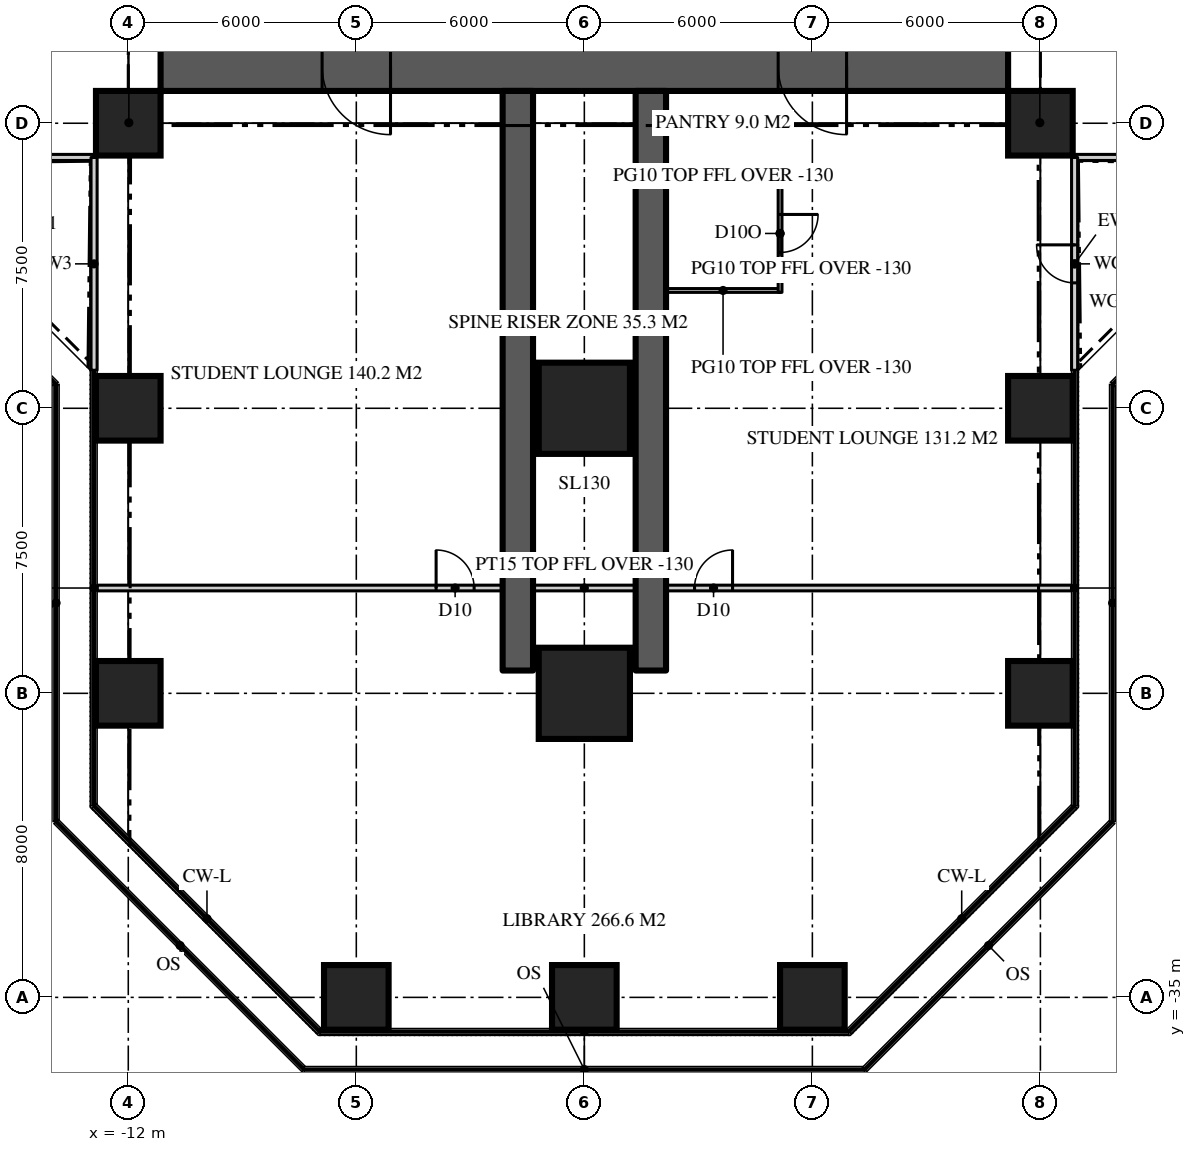
"""IFC4 building model, lengths in metres.
Left out: names, types, materials, properties, quantities, classifications, styles, units other than length and angle.
Written with IfcOpenShell. Run it as: python <this file> out.ifc"""

import sys

from ifc_helpers import new_model, si_unit, direction, frame, frame_2d, origin, origin_2d, place, context, subcontext, project, spatial, rectangle, extrude, element, fill, save


model = new_model("IFC4")
c1 = context("Model", 3, precision=1e-05, world=origin(), true_north=direction((0.0, 1.0)))
c2 = subcontext(c1, "Body", "Model", "MODEL_VIEW")
j1 = project(units=[si_unit("LENGTHUNIT", "METRE"), si_unit("PLANEANGLEUNIT", "RADIAN")], contexts=[c1])
p1 = place(None, origin())
s1 = spatial("IfcSite", under=j1, at=p1, CompositionType="ELEMENT")
p2 = place(p1, origin())
s2 = spatial("IfcBuilding", under=s1, at=p2, CompositionType="ELEMENT")
p3 = place(p2, frame((0.0, 0.0, 105.9)))
s3 = spatial("IfcBuildingStorey", under=s2, at=p3, CompositionType="ELEMENT", Elevation=105.9)
p4 = place(p3, frame((11.15, -10.5, 0.0), z_axis=(0.0, 0.0, 1.0), x_axis=(-1.0, 0.0, 0.0)))
e1 = element("IfcWall", 1, at=p4, inside=s3, PredefinedType="SHEAR", context=c2, shape_type="SweptSolid", body=[
    extrude(rectangle(XDim=22.3, YDim=1.3, at=frame_2d((11.15, 0.0))), origin(), (0.0, 0.0, 1.0), 3.9),
])
p5 = place(p4, frame((16.25, 0.0, 0.0)))
e2 = element("IfcOpeningElement", 2, at=p5, cuts=e1, PredefinedType="OPENING", context=c2, shape_type="SweptSolid", body=[
    extrude(rectangle(XDim=1.8, YDim=2.2, at=frame_2d((0.9, 1.1))), frame((0.0, 0.66, 0.0), z_axis=(0.0, -1.0, 0.0), x_axis=(1.0, 0.0, 0.0)), (0.0, 0.0, 1.0), 1.32),
])
p6 = place(p4, frame((4.25, 0.0, 0.0)))
e3 = element("IfcOpeningElement", 3, at=p6, cuts=e1, PredefinedType="OPENING", context=c2, shape_type="SweptSolid", body=[
    extrude(rectangle(XDim=1.8, YDim=2.2, at=frame_2d((0.9, 1.1))), frame((0.0, 0.66, 0.0), z_axis=(0.0, -1.0, 0.0), x_axis=(1.0, 0.0, 0.0)), (0.0, 0.0, 1.0), 1.32),
])
for number, where, z_axis, x_axis in (
    (4, (-1.75, -11.15, 0.0), (0.0, 0.0, 1.0), (0.0, -1.0, 0.0)),
    (5, (1.75, -11.15, 0.0), (0.0, 0.0, 1.0), (0.0, -1.0, 0.0)),
):
    element("IfcWall", number, at=place(p3, frame(where, z_axis=z_axis, x_axis=x_axis)), inside=s3, PredefinedType="SHEAR", context=c2, shape_type="SweptSolid", body=[
        extrude(rectangle(XDim=15.25, YDim=0.8, at=frame_2d((7.625, 0.0))), origin(), (0.0, 0.0, 1.0), 3.9),
    ])
for number, where, z_axis, x_axis in (
    (6, (-6.0, -35.0, 0.0), (0.0, 0.0, 1.0), (1.0, 0.0, 0.0)),
    (7, (0.0, -35.0, 0.0), (0.0, 0.0, 1.0), (1.0, 0.0, 0.0)),
    (8, (6.0, -35.0, 0.0), (0.0, 0.0, 1.0), (1.0, 0.0, 0.0)),
    (9, (-12.0, -27.0, 0.0), (0.0, 0.0, 1.0), (1.0, 0.0, 0.0)),
):
    element("IfcColumn", number, at=place(p3, frame(where, z_axis=z_axis, x_axis=x_axis)), inside=s3, PredefinedType="COLUMN", context=c2, shape_type="SweptSolid", body=[
        extrude(rectangle(XDim=1.7, YDim=1.7, at=origin_2d()), origin(), (0.0, 0.0, 1.0), 3.9),
    ])
p7 = place(p3, frame((0.0, -27.0, 0.0), z_axis=(0.0, 0.0, 1.0), x_axis=(1.0, 0.0, 0.0)))
e10 = element("IfcColumn", 10, at=p7, inside=s3, PredefinedType="COLUMN", context=c2, shape_type="SweptSolid", body=[
    extrude(rectangle(XDim=2.4, YDim=2.4, at=origin_2d()), origin(), (0.0, 0.0, 1.0), 3.9),
])
for number, where, z_axis, x_axis in (
    (11, (12.0, -27.0, 0.0), (0.0, 0.0, 1.0), (1.0, 0.0, 0.0)),
    (12, (-12.0, -19.5, 0.0), (0.0, 0.0, 1.0), (1.0, 0.0, 0.0)),
):
    element("IfcColumn", number, at=place(p3, frame(where, z_axis=z_axis, x_axis=x_axis)), inside=s3, PredefinedType="COLUMN", context=c2, shape_type="SweptSolid", body=[
        extrude(rectangle(XDim=1.7, YDim=1.7, at=origin_2d()), origin(), (0.0, 0.0, 1.0), 3.9),
    ])
p8 = place(p3, frame((0.0, -19.5, 0.0), z_axis=(0.0, 0.0, 1.0), x_axis=(1.0, 0.0, 0.0)))
e13 = element("IfcColumn", 13, at=p8, inside=s3, PredefinedType="COLUMN", context=c2, shape_type="SweptSolid", body=[
    extrude(rectangle(XDim=2.4, YDim=2.4, at=origin_2d()), origin(), (0.0, 0.0, 1.0), 3.9),
])
for number, where, z_axis, x_axis in (
    (14, (12.0, -19.5, 0.0), (0.0, 0.0, 1.0), (1.0, 0.0, 0.0)),
    (15, (-12.0, -12.0, 0.0), (0.0, 0.0, 1.0), (1.0, 0.0, 0.0)),
    (16, (12.0, -12.0, 0.0), (0.0, 0.0, 1.0), (1.0, 0.0, 0.0)),
):
    element("IfcColumn", number, at=place(p3, frame(where, z_axis=z_axis, x_axis=x_axis)), inside=s3, PredefinedType="COLUMN", context=c2, shape_type="SweptSolid", body=[
        extrude(rectangle(XDim=1.7, YDim=1.7, at=origin_2d()), origin(), (0.0, 0.0, 1.0), 3.9),
    ])
p9 = place(p3, frame((12.9, -12.9, 0.0), z_axis=(0.0, 0.0, 1.0), x_axis=(1.0, 0.0, 0.0)))
e17 = element("IfcWall", 17, at=p9, inside=s3, PredefinedType="SOLIDWALL", context=c2, shape_type="SweptSolid", body=[
    extrude(rectangle(XDim=5.6, YDim=0.16, at=frame_2d((2.8, 0.0))), origin(), (0.0, 0.0, 1.0), 3.77),
])
p10 = place(p3, frame((-18.5, -12.9, 0.0), z_axis=(0.0, 0.0, 1.0), x_axis=(1.0, 0.0, 0.0)))
e18 = element("IfcWall", 18, at=p10, inside=s3, PredefinedType="SOLIDWALL", context=c2, shape_type="SweptSolid", body=[
    extrude(rectangle(XDim=5.6, YDim=0.16, at=frame_2d((2.8, 0.0))), origin(), (0.0, 0.0, 1.0), 3.77),
])
p11 = place(p10, frame((2.3, 0.0, 0.0)))
e19 = element("IfcOpeningElement", 19, at=p11, cuts=e18, PredefinedType="OPENING", context=c2, shape_type="SweptSolid", body=[
    extrude(rectangle(XDim=1.0, YDim=2.2, at=frame_2d((0.5, 1.1))), frame((0.0, 0.09, 0.0), z_axis=(0.0, -1.0, 0.0), x_axis=(1.0, 0.0, 0.0)), (0.0, 0.0, 1.0), 0.18),
])
p12 = place(p3, frame((-12.9, -12.9, 0.0), z_axis=(0.0, 0.0, 1.0), x_axis=(0.0, -1.0, 0.0)))
e20 = element("IfcWall", 20, at=p12, inside=s3, PredefinedType="SOLIDWALL", context=c2, shape_type="SweptSolid", body=[
    extrude(rectangle(XDim=5.6, YDim=0.16, at=frame_2d((2.8, 0.0))), origin(), (0.0, 0.0, 1.0), 3.77),
])
p13 = place(p3, frame((12.9, -18.5, 0.0), z_axis=(0.0, 0.0, 1.0), x_axis=(0.0, 1.0, 0.0)))
e21 = element("IfcWall", 21, at=p13, inside=s3, PredefinedType="SOLIDWALL", context=c2, shape_type="SweptSolid", body=[
    extrude(rectangle(XDim=5.6, YDim=0.16, at=frame_2d((2.8, 0.0))), origin(), (0.0, 0.0, 1.0), 3.77),
])
p14 = place(p13, frame((2.3, 0.0, 0.0)))
e22 = element("IfcOpeningElement", 22, at=p14, cuts=e21, PredefinedType="OPENING", context=c2, shape_type="SweptSolid", body=[
    extrude(rectangle(XDim=1.0, YDim=2.2, at=frame_2d((0.5, 1.1))), frame((0.0, 0.09, 0.0), z_axis=(0.0, -1.0, 0.0), x_axis=(1.0, 0.0, 0.0)), (0.0, 0.0, 1.0), 0.18),
])
p15 = place(p3, frame((-12.82, -24.229, 0.0), z_axis=(0.0, 0.0, 1.0), x_axis=(1.0, 0.0, 0.0)))
e23 = element("IfcWall", 23, at=p15, inside=s3, PredefinedType="PARTITIONING", context=c2, shape_type="SweptSolid", body=[
    extrude(rectangle(XDim=25.64, YDim=0.15, at=frame_2d((12.82, 0.0))), origin(), (0.0, 0.0, 1.0), 3.77),
])
p16 = place(p15, frame((15.72, 0.0, 0.0)))
e24 = element("IfcOpeningElement", 24, at=p16, cuts=e23, PredefinedType="OPENING", context=c2, shape_type="SweptSolid", body=[
    extrude(rectangle(XDim=1.0, YDim=2.2, at=frame_2d((0.5, 1.1))), frame((0.0, 0.085, 0.0), z_axis=(0.0, -1.0, 0.0), x_axis=(1.0, 0.0, 0.0)), (0.0, 0.0, 1.0), 0.17),
])
p17 = place(p15, frame((8.92, 0.0, 0.0)))
e25 = element("IfcOpeningElement", 25, at=p17, cuts=e23, PredefinedType="OPENING", context=c2, shape_type="SweptSolid", body=[
    extrude(rectangle(XDim=1.0, YDim=2.2, at=frame_2d((0.5, 1.1))), frame((0.0, 0.085, 0.0), z_axis=(0.0, -1.0, 0.0), x_axis=(1.0, 0.0, 0.0)), (0.0, 0.0, 1.0), 0.17),
])
for number, where, z_axis, x_axis in (
    (26, (2.15, -13.4, 0.0), (0.0, 0.0, 1.0), (1.0, 0.0, 0.0)),
    (27, (2.15, -16.4, 0.0), (0.0, 0.0, 1.0), (1.0, 0.0, 0.0)),
):
    element("IfcWall", number, at=place(p3, frame(where, z_axis=z_axis, x_axis=x_axis)), inside=s3, PredefinedType="PARTITIONING", context=c2, shape_type="SweptSolid", body=[
        extrude(rectangle(XDim=3.0, YDim=0.1, at=frame_2d((1.5, 0.0))), origin(), (0.0, 0.0, 1.0), 3.77),
    ])
p18 = place(p3, frame((5.15, -13.35, 0.0), z_axis=(0.0, 0.0, 1.0), x_axis=(0.0, -1.0, 0.0)))
e28 = element("IfcWall", 28, at=p18, inside=s3, PredefinedType="PARTITIONING", context=c2, shape_type="SweptSolid", body=[
    extrude(rectangle(XDim=3.1, YDim=0.1, at=frame_2d((1.55, 0.0))), origin(), (0.0, 0.0, 1.0), 3.77),
])
p19 = place(p18, frame((1.05, 0.0, 0.0)))
e29 = element("IfcOpeningElement", 29, at=p19, cuts=e28, PredefinedType="OPENING", context=c2, shape_type="SweptSolid", body=[
    extrude(rectangle(XDim=1.0, YDim=2.2, at=frame_2d((0.5, 1.1))), frame((0.0, 0.06, 0.0), z_axis=(0.0, -1.0, 0.0), x_axis=(1.0, 0.0, 0.0)), (0.0, 0.0, 1.0), 0.12),
])
for number, where, z_axis, x_axis in (
    (30, (-11.15, -11.15, 0.0), (0.0, 0.0, 1.0), (-0.707, -0.707, 0.0)),
    (31, (11.15, -11.15, 0.0), (0.0, 0.0, 1.0), (0.707, -0.707, 0.0)),
):
    element("IfcWall", number, at=place(p3, frame(where, z_axis=z_axis, x_axis=x_axis)), inside=s3, PredefinedType="PARTITIONING", context=c2, shape_type="SweptSolid", body=[
        extrude(rectangle(XDim=2.362, YDim=0.15, at=frame_2d((1.181, 0.0))), origin(), (0.0, 0.0, 1.0), 3.22),
    ])
p20 = place(p14, origin())
e32 = element("IfcDoor", 32, at=p20, inside=s3, OperationType="SINGLE_SWING_RIGHT", PredefinedType="DOOR", context=c2, shape_type="SweptSolid", body=[
    extrude(rectangle(XDim=1.0, YDim=2.2, at=frame_2d((0.5, 1.1))), frame((0.0, 0.025, 0.0), z_axis=(0.0, -1.0, 0.0), x_axis=(1.0, 0.0, 0.0)), (0.0, 0.0, 1.0), 0.05),
])
fill(e22, e32)
p21 = place(p5, origin())
e33 = element("IfcDoor", 33, at=p21, inside=s3, OperationType="DOUBLE_DOOR_DOUBLE_SWING", PredefinedType="DOOR", context=c2, shape_type="SweptSolid", body=[
    extrude(rectangle(XDim=1.8, YDim=2.2, at=frame_2d((0.9, 1.1))), frame((0.0, 0.025, 0.0), z_axis=(0.0, -1.0, 0.0), x_axis=(1.0, 0.0, 0.0)), (0.0, 0.0, 1.0), 0.05),
])
fill(e2, e33)
p22 = place(p6, origin())
e34 = element("IfcDoor", 34, at=p22, inside=s3, OperationType="DOUBLE_DOOR_DOUBLE_SWING", PredefinedType="DOOR", context=c2, shape_type="SweptSolid", body=[
    extrude(rectangle(XDim=1.8, YDim=2.2, at=frame_2d((0.9, 1.1))), frame((0.0, 0.025, 0.0), z_axis=(0.0, -1.0, 0.0), x_axis=(1.0, 0.0, 0.0)), (0.0, 0.0, 1.0), 0.05),
])
fill(e3, e34)
p23 = place(p16, origin())
e35 = element("IfcDoor", 35, at=p23, inside=s3, OperationType="SINGLE_SWING_RIGHT", PredefinedType="DOOR", context=c2, shape_type="SweptSolid", body=[
    extrude(rectangle(XDim=1.0, YDim=2.2, at=frame_2d((0.5, 1.1))), frame((0.0, 0.025, 0.0), z_axis=(0.0, -1.0, 0.0), x_axis=(1.0, 0.0, 0.0)), (0.0, 0.0, 1.0), 0.05),
])
fill(e24, e35)
p24 = place(p17, origin())
e36 = element("IfcDoor", 36, at=p24, inside=s3, OperationType="SINGLE_SWING_LEFT", PredefinedType="DOOR", context=c2, shape_type="SweptSolid", body=[
    extrude(rectangle(XDim=1.0, YDim=2.2, at=frame_2d((0.5, 1.1))), frame((0.0, 0.025, 0.0), z_axis=(0.0, -1.0, 0.0), x_axis=(1.0, 0.0, 0.0)), (0.0, 0.0, 1.0), 0.05),
])
fill(e25, e36)
p25 = place(p19, origin())
e37 = element("IfcDoor", 37, at=p25, inside=s3, OperationType="SINGLE_SWING_LEFT", PredefinedType="DOOR", context=c2, shape_type="SweptSolid", body=[
    extrude(rectangle(XDim=1.0, YDim=2.2, at=frame_2d((0.5, 1.1))), frame((0.0, 0.025, 0.0), z_axis=(0.0, -1.0, 0.0), x_axis=(1.0, 0.0, 0.0)), (0.0, 0.0, 1.0), 0.05),
])
fill(e29, e37)
save(model, sys.argv[1])
